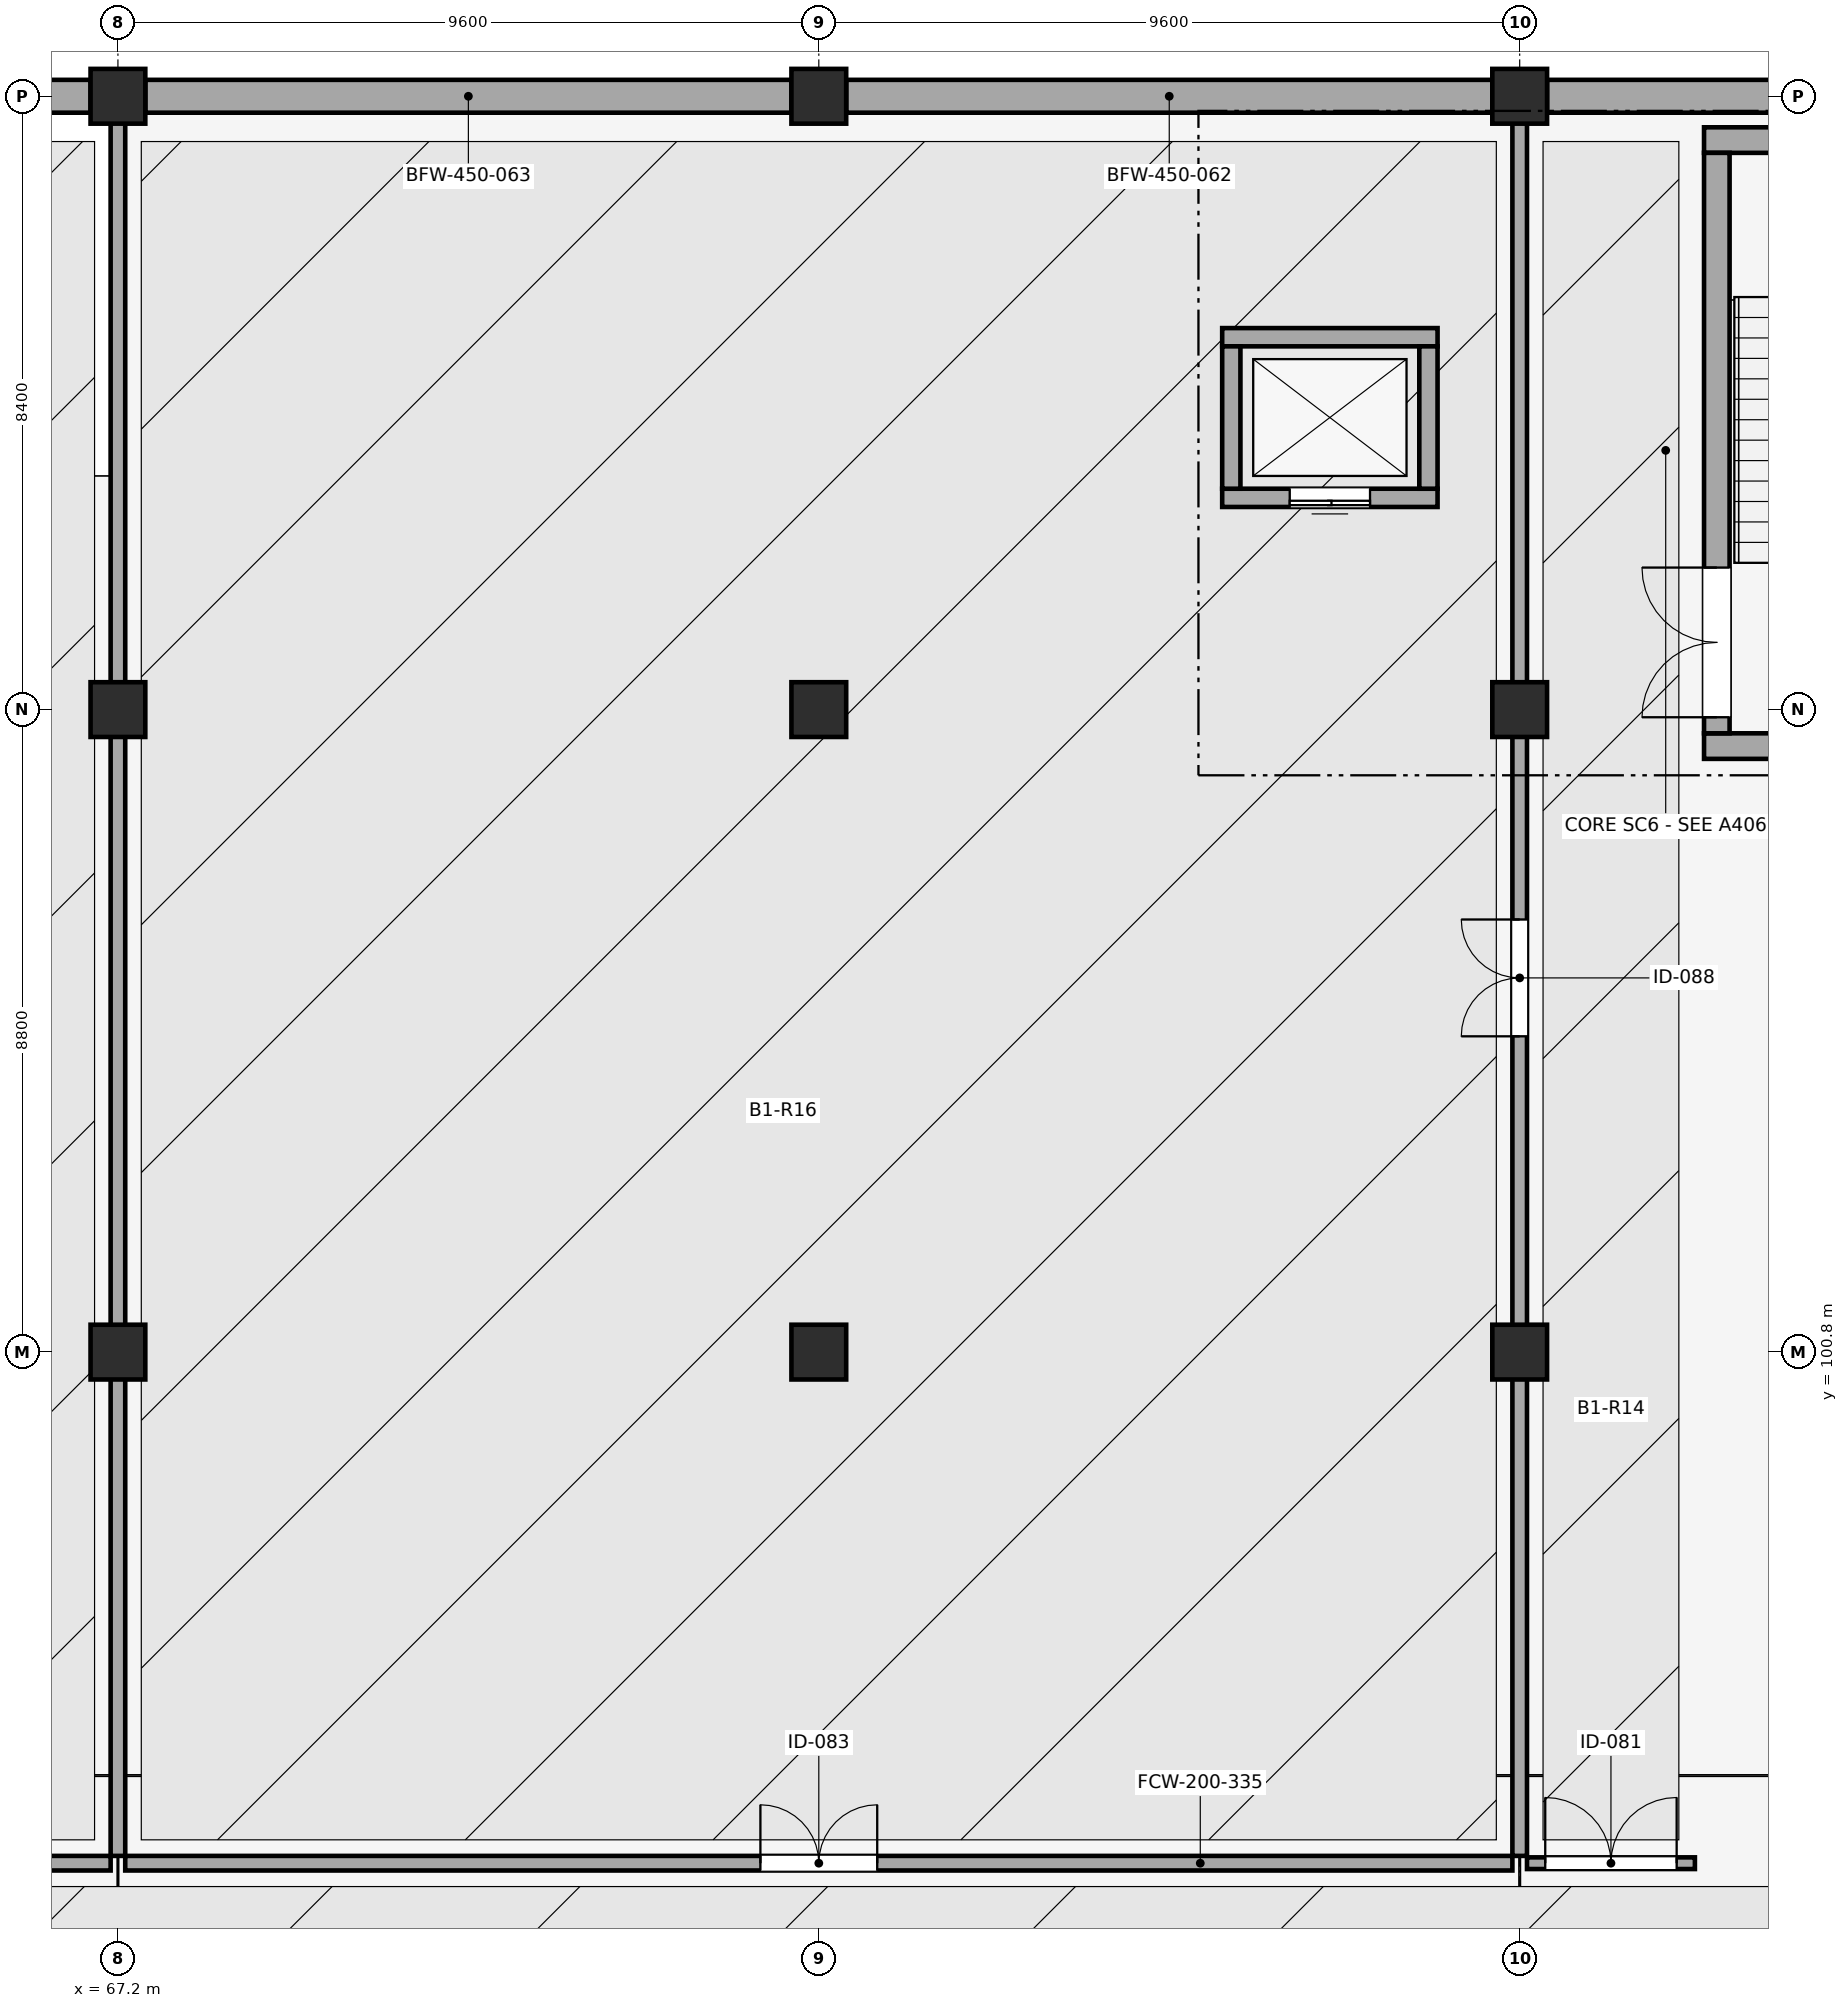
"""IFC4 building model, lengths in metres.
Left out: names, types, materials, properties, quantities, classifications, styles, units other than length and angle.
Written with IfcOpenShell. Run it as: python <this file> out.ifc"""

import sys

from ifc_helpers import new_model, si_unit, direction, frame, frame_2d, origin, origin_2d, place, context, subcontext, project, spatial, rectangle, extrude, element, fill, save


model = new_model("IFC4")
c1 = context("Model", 3, precision=1e-05, world=origin(), true_north=direction((0.0, 1.0)))
c2 = subcontext(c1, "Body", "Model", "MODEL_VIEW")
j1 = project(units=[si_unit("LENGTHUNIT", "METRE"), si_unit("PLANEANGLEUNIT", "RADIAN")], contexts=[c1])
p1 = place(None, origin())
s1 = spatial("IfcSite", under=j1, at=p1, CompositionType="ELEMENT")
p2 = place(p1, origin())
s2 = spatial("IfcBuilding", under=s1, at=p2, CompositionType="ELEMENT")
p3 = place(p2, frame((0.0, 0.0, -4.2)))
s3 = spatial("IfcBuildingStorey", under=s2, at=p3, CompositionType="ELEMENT", Elevation=-4.2)
for number, where, z_axis, x_axis in (
    (1, (67.2, 100.8, 0.0), (0.0, 0.0, 1.0), (1.0, 0.0, 0.0)),
    (2, (67.2, 109.6, 0.0), (0.0, 0.0, 1.0), (1.0, 0.0, 0.0)),
    (3, (67.2, 118.0, 0.0), (0.0, 0.0, 1.0), (1.0, 0.0, 0.0)),
    (4, (76.8, 100.8, 0.0), (0.0, 0.0, 1.0), (1.0, 0.0, 0.0)),
    (5, (76.8, 109.6, 0.0), (0.0, 0.0, 1.0), (1.0, 0.0, 0.0)),
    (6, (76.8, 118.0, 0.0), (0.0, 0.0, 1.0), (1.0, 0.0, 0.0)),
    (7, (86.4, 100.8, 0.0), (0.0, 0.0, 1.0), (1.0, 0.0, 0.0)),
    (8, (86.4, 109.6, 0.0), (0.0, 0.0, 1.0), (1.0, 0.0, 0.0)),
    (9, (86.4, 118.0, 0.0), (0.0, 0.0, 1.0), (1.0, 0.0, 0.0)),
):
    element("IfcColumn", number, at=place(p3, frame(where, z_axis=z_axis, x_axis=x_axis)), inside=s3, PredefinedType="COLUMN", context=c2, shape_type="SweptSolid", body=[
        extrude(rectangle(XDim=0.75, YDim=0.75, at=origin_2d()), origin(), (0.0, 0.0, 1.0), 4.2),
    ])
p4 = place(p3, frame((95.625, 118.0, 0.0), z_axis=(0.0, 0.0, 1.0), x_axis=(-1.0, 0.0, 0.0)))
e10 = element("IfcWall", 10, at=p4, inside=s3, PredefinedType="SOLIDWALL", context=c2, shape_type="SweptSolid", body=[
    extrude(rectangle(XDim=8.85, YDim=0.45, at=frame_2d((4.425, 0.0))), origin(), (0.0, 0.0, 1.0), 3.84),
])
p5 = place(p3, frame((86.025, 118.0, 0.0), z_axis=(0.0, 0.0, 1.0), x_axis=(-1.0, 0.0, 0.0)))
e11 = element("IfcWall", 11, at=p5, inside=s3, PredefinedType="SOLIDWALL", context=c2, shape_type="SweptSolid", body=[
    extrude(rectangle(XDim=8.85, YDim=0.45, at=frame_2d((4.425, 0.0))), origin(), (0.0, 0.0, 1.0), 3.84),
])
p6 = place(p3, frame((76.425, 118.0, 0.0), z_axis=(0.0, 0.0, 1.0), x_axis=(-1.0, 0.0, 0.0)))
e12 = element("IfcWall", 12, at=p6, inside=s3, PredefinedType="SOLIDWALL", context=c2, shape_type="SweptSolid", body=[
    extrude(rectangle(XDim=8.85, YDim=0.45, at=frame_2d((4.425, 0.0))), origin(), (0.0, 0.0, 1.0), 3.84),
])
p7 = place(p3, frame((66.825, 118.0, 0.0), z_axis=(0.0, 0.0, 1.0), x_axis=(-1.0, 0.0, 0.0)))
e13 = element("IfcWall", 13, at=p7, inside=s3, PredefinedType="SOLIDWALL", context=c2, shape_type="SweptSolid", body=[
    extrude(rectangle(XDim=8.85, YDim=0.45, at=frame_2d((4.425, 0.0))), origin(), (0.0, 0.0, 1.0), 3.84),
])
for number, where, z_axis, x_axis in (
    (14, (94.575, 109.1, 0.0), (0.0, 0.0, 1.0), (-1.0, 0.0, 0.0)),
    (15, (88.925, 117.4, 0.0), (0.0, 0.0, 1.0), (1.0, 0.0, 0.0)),
):
    element("IfcWall", number, at=place(p3, frame(where, z_axis=z_axis, x_axis=x_axis)), inside=s3, PredefinedType="SHEAR", context=c2, shape_type="SweptSolid", body=[
        extrude(rectangle(XDim=5.65, YDim=0.35, at=frame_2d((2.825, 0.0))), origin(), (0.0, 0.0, 1.0), 3.95),
    ])
p8 = place(p3, frame((89.1, 109.275, 0.0), z_axis=(0.0, 0.0, 1.0), x_axis=(0.0, 1.0, 0.0)))
e16 = element("IfcWall", 16, at=p8, inside=s3, PredefinedType="SHEAR", context=c2, shape_type="SweptSolid", body=[
    extrude(rectangle(XDim=7.95, YDim=0.35, at=frame_2d((3.975, 0.0))), origin(), (0.0, 0.0, 1.0), 3.95),
])
p9 = place(p8, frame((0.22, 0.0, 0.0)))
e17 = element("IfcOpeningElement", 17, at=p9, cuts=e16, PredefinedType="OPENING", context=c2, shape_type="SweptSolid", body=[
    extrude(rectangle(XDim=2.05, YDim=2.15, at=frame_2d((1.025, 1.075))), frame((0.0, 0.185, 0.0), z_axis=(0.0, -1.0, 0.0), x_axis=(1.0, 0.0, 0.0)), (0.0, 0.0, 1.0), 0.37),
])
p10 = place(p3, frame((85.275, 112.5, -1.5), z_axis=(0.0, 0.0, 1.0), x_axis=(-1.0, 0.0, 0.0)))
e18 = element("IfcWall", 18, at=p10, inside=s3, PredefinedType="SOLIDWALL", context=c2, shape_type="SweptSolid", body=[
    extrude(rectangle(XDim=2.95, YDim=0.25, at=frame_2d((1.475, 0.0))), origin(), (0.0, 0.0, 1.0), 5.45),
])
p11 = place(p10, frame((0.925, 0.0, 1.5)))
e19 = element("IfcOpeningElement", 19, at=p11, cuts=e18, PredefinedType="OPENING", context=c2, shape_type="SweptSolid", body=[
    extrude(rectangle(XDim=1.1, YDim=2.15, at=frame_2d((0.55, 1.075))), frame((0.0, 0.135, 0.0), z_axis=(0.0, -1.0, 0.0), x_axis=(1.0, 0.0, 0.0)), (0.0, 0.0, 1.0), 0.27),
])
p12 = place(p3, frame((82.325, 114.7, -1.5), z_axis=(0.0, 0.0, 1.0), x_axis=(1.0, 0.0, 0.0)))
e20 = element("IfcWall", 20, at=p12, inside=s3, PredefinedType="SOLIDWALL", context=c2, shape_type="SweptSolid", body=[
    extrude(rectangle(XDim=2.95, YDim=0.25, at=frame_2d((1.475, 0.0))), origin(), (0.0, 0.0, 1.0), 5.45),
])
for number, where, z_axis, x_axis in (
    (21, (82.45, 112.625, -1.5), (0.0, 0.0, 1.0), (0.0, 1.0, 0.0)),
    (22, (85.15, 114.575, -1.5), (0.0, 0.0, 1.0), (0.0, -1.0, 0.0)),
):
    element("IfcWall", number, at=place(p3, frame(where, z_axis=z_axis, x_axis=x_axis)), inside=s3, PredefinedType="SOLIDWALL", context=c2, shape_type="SweptSolid", body=[
        extrude(rectangle(XDim=1.95, YDim=0.25, at=frame_2d((0.975, 0.0))), origin(), (0.0, 0.0, 1.0), 5.45),
    ])
p13 = place(p3, frame((86.5, 93.8, 0.0), z_axis=(0.0, 0.0, 1.0), x_axis=(1.0, 0.0, 0.0)))
e23 = element("IfcWall", 23, at=p13, inside=s3, PredefinedType="PARTITIONING", context=c2, shape_type="SweptSolid", body=[
    extrude(rectangle(XDim=2.3, YDim=0.16, at=frame_2d((1.15, 0.0))), origin(), (0.0, 0.0, 1.0), 3.84),
])
p14 = place(p13, frame((0.25, 0.0, 0.0)))
e24 = element("IfcOpeningElement", 24, at=p14, cuts=e23, PredefinedType="OPENING", context=c2, shape_type="SweptSolid", body=[
    extrude(rectangle(XDim=1.8, YDim=2.15, at=frame_2d((0.9, 1.075))), frame((0.0, 0.09, 0.0), z_axis=(0.0, -1.0, 0.0), x_axis=(1.0, 0.0, 0.0)), (0.0, 0.0, 1.0), 0.18),
])
p15 = place(p3, frame((52.0, 93.8, 0.0), z_axis=(0.0, 0.0, 1.0), x_axis=(1.0, 0.0, 0.0)))
e25 = element("IfcWall", 25, at=p15, inside=s3, PredefinedType="PARTITIONING", context=c2, shape_type="SweptSolid", body=[
    extrude(rectangle(XDim=15.1, YDim=0.2, at=frame_2d((7.55, 0.0))), origin(), (0.0, 0.0, 1.0), 3.84),
])
p16 = place(p15, frame((6.75, 0.0, 0.0)))
e26 = element("IfcOpeningElement", 26, at=p16, cuts=e25, PredefinedType="OPENING", context=c2, shape_type="SweptSolid", body=[
    extrude(rectangle(XDim=1.6, YDim=2.2, at=frame_2d((0.8, 1.1))), frame((0.0, 0.11, 0.0), z_axis=(0.0, -1.0, 0.0), x_axis=(1.0, 0.0, 0.0)), (0.0, 0.0, 1.0), 0.22),
])
p17 = place(p3, frame((67.3, 93.8, 0.0), z_axis=(0.0, 0.0, 1.0), x_axis=(1.0, 0.0, 0.0)))
e27 = element("IfcWall", 27, at=p17, inside=s3, PredefinedType="PARTITIONING", context=c2, shape_type="SweptSolid", body=[
    extrude(rectangle(XDim=19.0, YDim=0.2, at=frame_2d((9.5, 0.0))), origin(), (0.0, 0.0, 1.0), 3.84),
])
p18 = place(p17, frame((8.7, 0.0, 0.0)))
e28 = element("IfcOpeningElement", 28, at=p18, cuts=e27, PredefinedType="OPENING", context=c2, shape_type="SweptSolid", body=[
    extrude(rectangle(XDim=1.6, YDim=2.2, at=frame_2d((0.8, 1.1))), frame((0.0, 0.11, 0.0), z_axis=(0.0, -1.0, 0.0), x_axis=(1.0, 0.0, 0.0)), (0.0, 0.0, 1.0), 0.22),
])
p19 = place(p3, frame((86.4, 93.9, 0.0), z_axis=(0.0, 0.0, 1.0), x_axis=(0.0, 1.0, 0.0)))
e29 = element("IfcWall", 29, at=p19, inside=s3, PredefinedType="PARTITIONING", context=c2, shape_type="SweptSolid", body=[
    extrude(rectangle(XDim=24.05, YDim=0.2, at=frame_2d((12.025, 0.0))), origin(), (0.0, 0.0, 1.0), 3.295),
])
p20 = place(p19, frame((11.225, 0.0, 0.0)))
e30 = element("IfcOpeningElement", 30, at=p20, cuts=e29, PredefinedType="OPENING", context=c2, shape_type="SweptSolid", body=[
    extrude(rectangle(XDim=1.6, YDim=2.2, at=frame_2d((0.8, 1.1))), frame((0.0, 0.11, 0.0), z_axis=(0.0, -1.0, 0.0), x_axis=(1.0, 0.0, 0.0)), (0.0, 0.0, 1.0), 0.22),
])
p21 = place(p3, frame((67.2, 93.9, 0.0), z_axis=(0.0, 0.0, 1.0), x_axis=(0.0, 1.0, 0.0)))
e31 = element("IfcWall", 31, at=p21, inside=s3, PredefinedType="PARTITIONING", context=c2, shape_type="SweptSolid", body=[
    extrude(rectangle(XDim=24.05, YDim=0.2, at=frame_2d((12.025, 0.0))), origin(), (0.0, 0.0, 1.0), 3.255),
])
p22 = place(p9, origin())
e32 = element("IfcDoor", 32, at=p22, inside=s3, OperationType="DOUBLE_DOOR_SINGLE_SWING", PredefinedType="DOOR", context=c2, shape_type="SweptSolid", body=[
    extrude(rectangle(XDim=2.05, YDim=2.15, at=frame_2d((1.025, 1.075))), frame((0.0, 0.025, 0.0), z_axis=(0.0, -1.0, 0.0), x_axis=(1.0, 0.0, 0.0)), (0.0, 0.0, 1.0), 0.05),
])
fill(e17, e32)
p23 = place(p11, origin())
e33 = element("IfcDoor", 33, at=p23, inside=s3, OperationType="DOUBLE_DOOR_SLIDING", PredefinedType="DOOR", context=c2, shape_type="SweptSolid", body=[
    extrude(rectangle(XDim=1.1, YDim=2.15, at=frame_2d((0.55, 1.075))), frame((0.0, 0.025, 0.0), z_axis=(0.0, -1.0, 0.0), x_axis=(1.0, 0.0, 0.0)), (0.0, 0.0, 1.0), 0.05),
])
fill(e19, e33)
p24 = place(p14, origin())
e34 = element("IfcDoor", 34, at=p24, inside=s3, OperationType="DOUBLE_DOOR_SINGLE_SWING", PredefinedType="DOOR", context=c2, shape_type="SweptSolid", body=[
    extrude(rectangle(XDim=1.8, YDim=2.15, at=frame_2d((0.9, 1.075))), frame((0.0, 0.025, 0.0), z_axis=(0.0, -1.0, 0.0), x_axis=(1.0, 0.0, 0.0)), (0.0, 0.0, 1.0), 0.05),
])
fill(e24, e34)
p25 = place(p18, origin())
e35 = element("IfcDoor", 35, at=p25, inside=s3, OperationType="DOUBLE_DOOR_SINGLE_SWING", PredefinedType="DOOR", context=c2, shape_type="SweptSolid", body=[
    extrude(rectangle(XDim=1.6, YDim=2.2, at=frame_2d((0.8, 1.1))), frame((0.0, 0.025, 0.0), z_axis=(0.0, -1.0, 0.0), x_axis=(1.0, 0.0, 0.0)), (0.0, 0.0, 1.0), 0.05),
])
fill(e28, e35)
p26 = place(p20, origin())
e36 = element("IfcDoor", 36, at=p26, inside=s3, OperationType="DOUBLE_DOOR_SINGLE_SWING", PredefinedType="DOOR", context=c2, shape_type="SweptSolid", body=[
    extrude(rectangle(XDim=1.6, YDim=2.2, at=frame_2d((0.8, 1.1))), frame((0.0, 0.025, 0.0), z_axis=(0.0, -1.0, 0.0), x_axis=(1.0, 0.0, 0.0)), (0.0, 0.0, 1.0), 0.05),
])
fill(e30, e36)
save(model, sys.argv[1])
